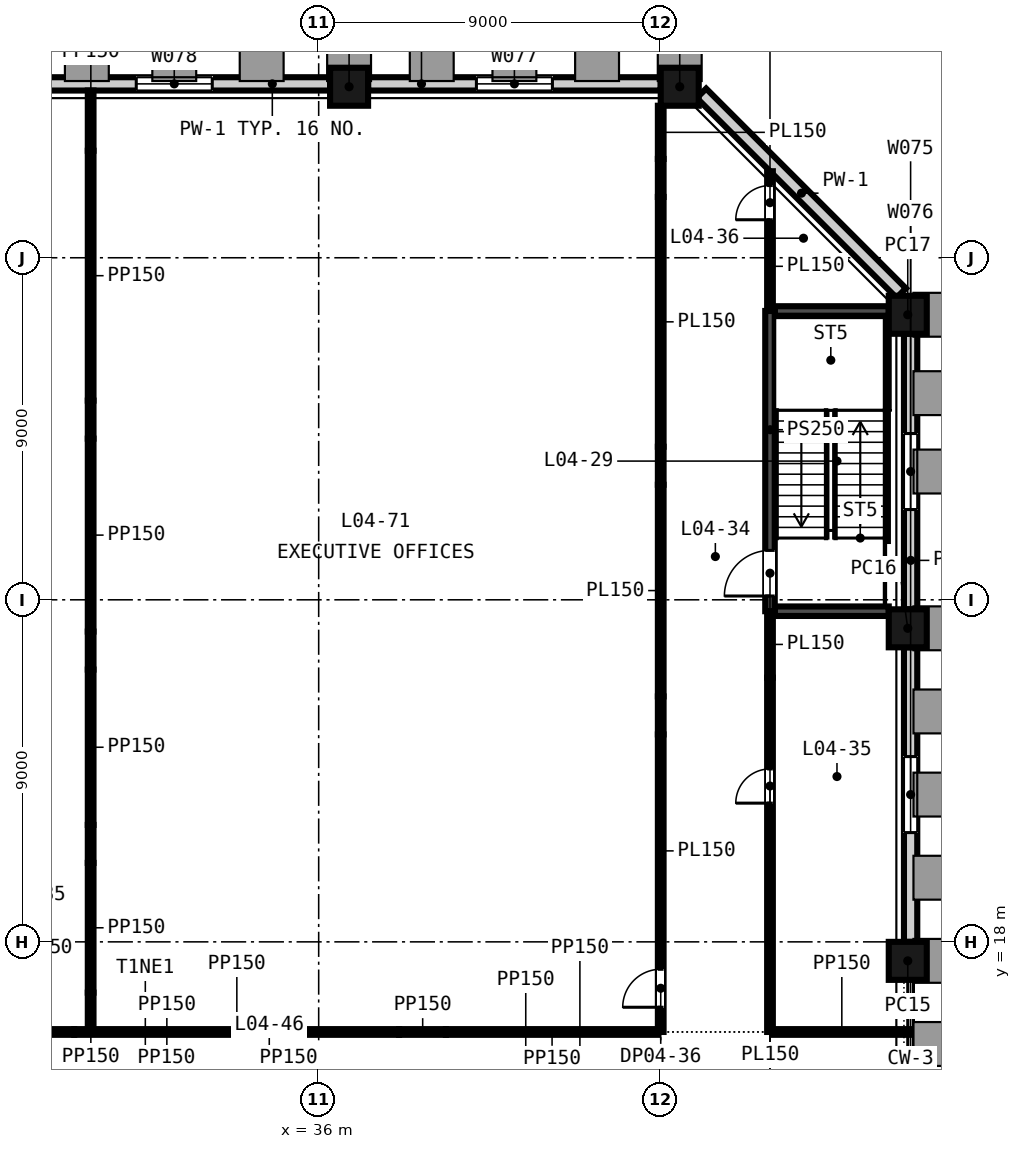
"""IFC4 building model, lengths in metres.
Left out: names, types, materials, properties, quantities, classifications, styles, units other than length and angle.
Written with IfcOpenShell. Run it as: python <this file> out.ifc"""

import sys

from ifc_helpers import new_model, si_unit, direction, frame, frame_2d, origin, origin_2d, place, context, subcontext, project, spatial, rectangle, extrude, element, fill, save


model = new_model("IFC4")
c1 = context("Model", 3, precision=1e-05, world=origin(), true_north=direction((0.0, 1.0)))
c2 = subcontext(c1, "Body", "Model", "MODEL_VIEW")
j1 = project(units=[si_unit("LENGTHUNIT", "METRE"), si_unit("PLANEANGLEUNIT", "RADIAN")], contexts=[c1])
p1 = place(None, origin())
s1 = spatial("IfcSite", under=j1, at=p1, CompositionType="ELEMENT")
p2 = place(p1, origin())
s2 = spatial("IfcBuilding", under=s1, at=p2, CompositionType="ELEMENT")
p3 = place(p2, frame((0.0, 0.0, 27.0)))
s3 = spatial("IfcBuildingStorey", under=s2, at=p3, CompositionType="ELEMENT", Elevation=27.0)
for number, where, z_axis, x_axis in (
    (1, (51.5, 17.5, -0.3), (0.0, 0.0, 1.0), (0.0, 1.0, 0.0)),
    (2, (51.5, 26.25, -0.3), (0.0, 0.0, 1.0), (0.0, 1.0, 0.0)),
    (3, (51.5, 34.5, -0.3), (0.0, 0.0, 1.0), (0.0, 1.0, 0.0)),
    (4, (45.5, 40.5, -0.3), (0.0, 0.0, 1.0), (-1.0, 0.0, 0.0)),
    (5, (36.8, 40.5, -0.3), (0.0, 0.0, 1.0), (-1.0, 0.0, 0.0)),
):
    element("IfcColumn", number, at=place(p3, frame(where, z_axis=z_axis, x_axis=x_axis)), inside=s3, PredefinedType="COLUMN", context=c2, shape_type="SweptSolid", body=[
        extrude(rectangle(XDim=1.0, YDim=1.0, at=origin_2d()), origin(), (0.0, 0.0, 1.0), 4.5),
    ])
p4 = place(p3, frame((51.575, 18.0, -0.3), z_axis=(0.0, 0.0, 1.0), x_axis=(0.0, 1.0, 0.0)))
e6 = element("IfcWall", 6, at=p4, inside=s3, PredefinedType="SOLIDWALL", context=c2, shape_type="SweptSolid", body=[
    extrude(rectangle(XDim=7.75, YDim=0.35, at=frame_2d((3.875, 0.0))), origin(), (0.0, 0.0, 1.0), 3.6),
])
p5 = place(p4, frame((2.875, 0.0, 1.2)))
e7 = element("IfcOpeningElement", 7, at=p5, cuts=e6, PredefinedType="OPENING", context=c2, shape_type="SweptSolid", body=[
    extrude(rectangle(XDim=2.0, YDim=2.35, at=frame_2d((1.0, 1.175))), frame((0.0, 0.185, 0.0), z_axis=(0.0, -1.0, 0.0), x_axis=(1.0, 0.0, 0.0)), (0.0, 0.0, 1.0), 0.37),
])
p6 = place(p3, frame((51.575, 26.75, -0.3), z_axis=(0.0, 0.0, 1.0), x_axis=(0.0, 1.0, 0.0)))
e8 = element("IfcWall", 8, at=p6, inside=s3, PredefinedType="SOLIDWALL", context=c2, shape_type="SweptSolid", body=[
    extrude(rectangle(XDim=7.25, YDim=0.35, at=frame_2d((3.625, 0.0))), origin(), (0.0, 0.0, 1.0), 3.6),
])
p7 = place(p6, frame((2.625, 0.0, 1.2)))
e9 = element("IfcOpeningElement", 9, at=p7, cuts=e8, PredefinedType="OPENING", context=c2, shape_type="SweptSolid", body=[
    extrude(rectangle(XDim=2.0, YDim=2.35, at=frame_2d((1.0, 1.175))), frame((0.0, 0.185, 0.0), z_axis=(0.0, -1.0, 0.0), x_axis=(1.0, 0.0, 0.0)), (0.0, 0.0, 1.0), 0.37),
])
p8 = place(p3, frame((51.327, 35.072, -0.3), z_axis=(0.0, 0.0, 1.0), x_axis=(-0.707106781187, 0.707106781187, 0.0)))
e10 = element("IfcWall", 10, at=p8, inside=s3, PredefinedType="SOLIDWALL", context=c2, shape_type="SweptSolid", body=[
    extrude(rectangle(XDim=7.433, YDim=0.35, at=frame_2d((3.716, 0.0))), origin(), (0.0, 0.0, 1.0), 3.6),
])
p9 = place(p3, frame((45.0, 40.575, -0.3), z_axis=(0.0, 0.0, 1.0), x_axis=(-1.0, 0.0, 0.0)))
e11 = element("IfcWall", 11, at=p9, inside=s3, PredefinedType="SOLIDWALL", context=c2, shape_type="SweptSolid", body=[
    extrude(rectangle(XDim=7.7, YDim=0.35, at=frame_2d((3.85, 0.0))), origin(), (0.0, 0.0, 1.0), 3.6),
])
p10 = place(p9, frame((2.85, 0.0, 1.2)))
e12 = element("IfcOpeningElement", 12, at=p10, cuts=e11, PredefinedType="OPENING", context=c2, shape_type="SweptSolid", body=[
    extrude(rectangle(XDim=2.0, YDim=2.35, at=frame_2d((1.0, 1.175))), frame((0.0, 0.185, 0.0), z_axis=(0.0, -1.0, 0.0), x_axis=(1.0, 0.0, 0.0)), (0.0, 0.0, 1.0), 0.37),
])
p11 = place(p3, frame((36.3, 40.575, -0.3), z_axis=(0.0, 0.0, 1.0), x_axis=(-1.0, 0.0, 0.0)))
e13 = element("IfcWall", 13, at=p11, inside=s3, PredefinedType="SOLIDWALL", context=c2, shape_type="SweptSolid", body=[
    extrude(rectangle(XDim=8.2, YDim=0.35, at=frame_2d((4.1, 0.0))), origin(), (0.0, 0.0, 1.0), 3.6),
])
p12 = place(p11, frame((3.1, 0.0, 1.2)))
e14 = element("IfcOpeningElement", 14, at=p12, cuts=e13, PredefinedType="OPENING", context=c2, shape_type="SweptSolid", body=[
    extrude(rectangle(XDim=2.0, YDim=2.35, at=frame_2d((1.0, 1.175))), frame((0.0, 0.185, 0.0), z_axis=(0.0, -1.0, 0.0), x_axis=(1.0, 0.0, 0.0)), (0.0, 0.0, 1.0), 0.37),
])
p13 = place(p3, frame((26.869, 15.629, 0.0), z_axis=(0.0, 0.0, 1.0), x_axis=(1.0, 0.0, 0.0)))
e15 = element("IfcWall", 15, at=p13, inside=s3, PredefinedType="PARTITIONING", context=c2, shape_type="SweptSolid", body=[
    extrude(rectangle(XDim=2.698, YDim=0.15, at=frame_2d((1.349, 0.0))), origin(), (0.0, 0.0, 1.0), 3.111),
])
p14 = place(p13, frame((0.9, 0.0, 0.0)))
e16 = element("IfcOpeningElement", 16, at=p14, cuts=e15, PredefinedType="OPENING", context=c2, shape_type="SweptSolid", body=[
    extrude(rectangle(XDim=1.0, YDim=2.1, at=frame_2d((0.5, 1.05))), frame((0.0, 0.085, 0.0), z_axis=(0.0, -1.0, 0.0), x_axis=(1.0, 0.0, 0.0)), (0.0, 0.0, 1.0), 0.17),
])
p15 = place(p3, frame((29.567, 15.629, 0.0), z_axis=(0.0, 0.0, 1.0), x_axis=(1.0, 0.0, 0.0)))
e17 = element("IfcWall", 17, at=p15, inside=s3, PredefinedType="PARTITIONING", context=c2, shape_type="SweptSolid", body=[
    extrude(rectangle(XDim=8.548, YDim=0.15, at=frame_2d((4.274, 0.0))), origin(), (0.0, 0.0, 1.0), 4.2),
])
p16 = place(p3, frame((38.116, 15.629, 0.0), z_axis=(0.0, 0.0, 1.0), x_axis=(1.0, 0.0, 0.0)))
e18 = element("IfcWall", 18, at=p16, inside=s3, PredefinedType="PARTITIONING", context=c2, shape_type="SweptSolid", body=[
    extrude(rectangle(XDim=1.231, YDim=0.15, at=frame_2d((0.616, 0.0))), origin(), (0.0, 0.0, 1.0), 3.219),
])
p17 = place(p3, frame((39.347, 15.629, 0.0), z_axis=(0.0, 0.0, 1.0), x_axis=(1.0, 0.0, 0.0)))
e19 = element("IfcWall", 19, at=p17, inside=s3, PredefinedType="PARTITIONING", context=c2, shape_type="SweptSolid", body=[
    extrude(rectangle(XDim=5.578, YDim=0.15, at=frame_2d((2.789, 0.0))), origin(), (0.0, 0.0, 1.0), 4.2),
])
p18 = place(p3, frame((47.95, 15.629, 0.0), z_axis=(0.0, 0.0, 1.0), x_axis=(1.0, 0.0, 0.0)))
e20 = element("IfcWall", 20, at=p18, inside=s3, PredefinedType="PARTITIONING", context=c2, shape_type="SweptSolid", body=[
    extrude(rectangle(XDim=3.62, YDim=0.15, at=frame_2d((1.81, 0.0))), origin(), (0.0, 0.0, 1.0), 4.2),
])
for number, where, z_axis, x_axis in (
    (21, (48.0, 26.7, 0.0), (0.0, 0.0, 1.0), (1.0, 0.0, 0.0)),
    (22, (48.0, 34.6, 0.0), (0.0, 0.0, 1.0), (1.0, 0.0, 0.0)),
):
    element("IfcWall", number, at=place(p3, frame(where, z_axis=z_axis, x_axis=x_axis)), inside=s3, PredefinedType="SHEAR", context=c2, shape_type="SweptSolid", body=[
        extrude(rectangle(XDim=3.0, YDim=0.25, at=frame_2d((1.5, 0.0))), origin(), (0.0, 0.0, 1.0), 4.2),
    ])
p19 = place(p3, frame((30.0, 15.704, 0.0), z_axis=(0.0, 0.0, 1.0), x_axis=(0.0, 1.0, 0.0)))
e23 = element("IfcWall", 23, at=p19, inside=s3, PredefinedType="PARTITIONING", context=c2, shape_type="SweptSolid", body=[
    extrude(rectangle(XDim=0.96, YDim=0.15, at=frame_2d((0.48, 0.0))), origin(), (0.0, 0.0, 1.0), 3.111),
])
p20 = place(p3, frame((30.0, 16.664, 0.0), z_axis=(0.0, 0.0, 1.0), x_axis=(0.0, 1.0, 0.0)))
e24 = element("IfcWall", 24, at=p20, inside=s3, PredefinedType="PARTITIONING", context=c2, shape_type="SweptSolid", body=[
    extrude(rectangle(XDim=3.413, YDim=0.15, at=frame_2d((1.707, 0.0))), origin(), (0.0, 0.0, 1.0), 4.2),
])
p21 = place(p3, frame((30.0, 20.077, 0.0), z_axis=(0.0, 0.0, 1.0), x_axis=(0.0, 1.0, 0.0)))
e25 = element("IfcWall", 25, at=p21, inside=s3, PredefinedType="PARTITIONING", context=c2, shape_type="SweptSolid", body=[
    extrude(rectangle(XDim=1.0, YDim=0.15, at=frame_2d((0.5, 0.0))), origin(), (0.0, 0.0, 1.0), 3.111),
])
p22 = place(p3, frame((30.0, 21.077, 0.0), z_axis=(0.0, 0.0, 1.0), x_axis=(0.0, 1.0, 0.0)))
e26 = element("IfcWall", 26, at=p22, inside=s3, PredefinedType="PARTITIONING", context=c2, shape_type="SweptSolid", body=[
    extrude(rectangle(XDim=4.087, YDim=0.15, at=frame_2d((2.043, 0.0))), origin(), (0.0, 0.0, 1.0), 4.2),
])
p23 = place(p3, frame((30.0, 25.164, 0.0), z_axis=(0.0, 0.0, 1.0), x_axis=(0.0, 1.0, 0.0)))
e27 = element("IfcWall", 27, at=p23, inside=s3, PredefinedType="PARTITIONING", context=c2, shape_type="SweptSolid", body=[
    extrude(rectangle(XDim=1.0, YDim=0.15, at=frame_2d((0.5, 0.0))), origin(), (0.0, 0.0, 1.0), 3.111),
])
p24 = place(p3, frame((30.0, 26.164, 0.0), z_axis=(0.0, 0.0, 1.0), x_axis=(0.0, 1.0, 0.0)))
e28 = element("IfcWall", 28, at=p24, inside=s3, PredefinedType="PARTITIONING", context=c2, shape_type="SweptSolid", body=[
    extrude(rectangle(XDim=5.076, YDim=0.15, at=frame_2d((2.538, 0.0))), origin(), (0.0, 0.0, 1.0), 4.2),
])
p25 = place(p3, frame((30.0, 31.24, 0.0), z_axis=(0.0, 0.0, 1.0), x_axis=(0.0, 1.0, 0.0)))
e29 = element("IfcWall", 29, at=p25, inside=s3, PredefinedType="PARTITIONING", context=c2, shape_type="SweptSolid", body=[
    extrude(rectangle(XDim=1.0, YDim=0.15, at=frame_2d((0.5, 0.0))), origin(), (0.0, 0.0, 1.0), 3.111),
])
p26 = place(p3, frame((30.0, 32.24, 0.0), z_axis=(0.0, 0.0, 1.0), x_axis=(0.0, 1.0, 0.0)))
e30 = element("IfcWall", 30, at=p26, inside=s3, PredefinedType="PARTITIONING", context=c2, shape_type="SweptSolid", body=[
    extrude(rectangle(XDim=6.575, YDim=0.15, at=frame_2d((3.288, 0.0))), origin(), (0.0, 0.0, 1.0), 4.2),
])
p27 = place(p3, frame((30.0, 38.816, 0.0), z_axis=(0.0, 0.0, 1.0), x_axis=(0.0, 1.0, 0.0)))
e31 = element("IfcWall", 31, at=p27, inside=s3, PredefinedType="PARTITIONING", context=c2, shape_type="SweptSolid", body=[
    extrude(rectangle(XDim=1.584, YDim=0.15, at=frame_2d((0.792, 0.0))), origin(), (0.0, 0.0, 1.0), 3.298),
])
p28 = place(p3, frame((45.0, 15.629, 0.0), z_axis=(0.0, 0.0, 1.0), x_axis=(0.0, 1.0, 0.0)))
e32 = element("IfcWall", 32, at=p28, inside=s3, PredefinedType="PARTITIONING", context=c2, shape_type="SweptSolid", body=[
    extrude(rectangle(XDim=7.829, YDim=0.15, at=frame_2d((3.915, 0.0))), origin(), (0.0, 0.0, 1.0), 4.2),
])
p29 = place(p28, frame((0.65, 0.0, 0.0)))
e33 = element("IfcOpeningElement", 33, at=p29, cuts=e32, PredefinedType="OPENING", context=c2, shape_type="SweptSolid", body=[
    extrude(rectangle(XDim=1.0, YDim=2.1, at=frame_2d((0.5, 1.05))), frame((0.0, 0.085, 0.0), z_axis=(0.0, -1.0, 0.0), x_axis=(1.0, 0.0, 0.0)), (0.0, 0.0, 1.0), 0.17),
])
p30 = place(p3, frame((45.0, 23.458, 0.0), z_axis=(0.0, 0.0, 1.0), x_axis=(0.0, 1.0, 0.0)))
e34 = element("IfcWall", 34, at=p30, inside=s3, PredefinedType="PARTITIONING", context=c2, shape_type="SweptSolid", body=[
    extrude(rectangle(XDim=1.0, YDim=0.15, at=frame_2d((0.5, 0.0))), origin(), (0.0, 0.0, 1.0), 3.111),
])
p31 = place(p3, frame((45.0, 24.458, 0.0), z_axis=(0.0, 0.0, 1.0), x_axis=(0.0, 1.0, 0.0)))
e35 = element("IfcWall", 35, at=p31, inside=s3, PredefinedType="PARTITIONING", context=c2, shape_type="SweptSolid", body=[
    extrude(rectangle(XDim=5.569, YDim=0.15, at=frame_2d((2.785, 0.0))), origin(), (0.0, 0.0, 1.0), 4.2),
])
p32 = place(p3, frame((45.0, 30.028, 0.0), z_axis=(0.0, 0.0, 1.0), x_axis=(0.0, 1.0, 0.0)))
e36 = element("IfcWall", 36, at=p32, inside=s3, PredefinedType="PARTITIONING", context=c2, shape_type="SweptSolid", body=[
    extrude(rectangle(XDim=1.0, YDim=0.15, at=frame_2d((0.5, 0.0))), origin(), (0.0, 0.0, 1.0), 3.111),
])
p33 = place(p3, frame((45.0, 31.028, 0.0), z_axis=(0.0, 0.0, 1.0), x_axis=(0.0, 1.0, 0.0)))
e37 = element("IfcWall", 37, at=p33, inside=s3, PredefinedType="PARTITIONING", context=c2, shape_type="SweptSolid", body=[
    extrude(rectangle(XDim=6.573, YDim=0.15, at=frame_2d((3.286, 0.0))), origin(), (0.0, 0.0, 1.0), 4.2),
])
p34 = place(p3, frame((45.0, 37.6, 0.0), z_axis=(0.0, 0.0, 1.0), x_axis=(0.0, 1.0, 0.0)))
e38 = element("IfcWall", 38, at=p34, inside=s3, PredefinedType="PARTITIONING", context=c2, shape_type="SweptSolid", body=[
    extrude(rectangle(XDim=1.0, YDim=0.15, at=frame_2d((0.5, 0.0))), origin(), (0.0, 0.0, 1.0), 3.111),
])
p35 = place(p3, frame((45.0, 38.6, 0.0), z_axis=(0.0, 0.0, 1.0), x_axis=(0.0, 1.0, 0.0)))
e39 = element("IfcWall", 39, at=p35, inside=s3, PredefinedType="PARTITIONING", context=c2, shape_type="SweptSolid", body=[
    extrude(rectangle(XDim=1.4, YDim=0.15, at=frame_2d((0.7, 0.0))), origin(), (0.0, 0.0, 1.0), 4.2),
])
p36 = place(p3, frame((47.875, 15.629, 0.0), z_axis=(0.0, 0.0, 1.0), x_axis=(0.0, 1.0, 0.0)))
e40 = element("IfcWall", 40, at=p36, inside=s3, PredefinedType="PARTITIONING", context=c2, shape_type="SweptSolid", body=[
    extrude(rectangle(XDim=9.323, YDim=0.15, at=frame_2d((4.661, 0.0))), origin(), (0.0, 0.0, 1.0), 4.2),
])
p37 = place(p36, frame((6.021, 0.0, 0.0)))
e41 = element("IfcOpeningElement", 41, at=p37, cuts=e40, PredefinedType="OPENING", context=c2, shape_type="SweptSolid", body=[
    extrude(rectangle(XDim=0.9, YDim=2.1, at=frame_2d((0.45, 1.05))), frame((0.0, 0.085, 0.0), z_axis=(0.0, -1.0, 0.0), x_axis=(1.0, 0.0, 0.0)), (0.0, 0.0, 1.0), 0.17),
])
p38 = place(p3, frame((47.875, 24.952, 0.0), z_axis=(0.0, 0.0, 1.0), x_axis=(0.0, 1.0, 0.0)))
e42 = element("IfcWall", 42, at=p38, inside=s3, PredefinedType="PARTITIONING", context=c2, shape_type="SweptSolid", body=[
    extrude(rectangle(XDim=1.748, YDim=0.15, at=frame_2d((0.874, 0.0))), origin(), (0.0, 0.0, 1.0), 3.111),
])
p39 = place(p3, frame((47.875, 26.7, 0.0), z_axis=(0.0, 0.0, 1.0), x_axis=(0.0, 1.0, 0.0)))
e43 = element("IfcWall", 43, at=p39, inside=s3, PredefinedType="SHEAR", context=c2, shape_type="SweptSolid", body=[
    extrude(rectangle(XDim=7.9, YDim=0.25, at=frame_2d((3.95, 0.0))), origin(), (0.0, 0.0, 1.0), 4.2),
])
p40 = place(p39, frame((0.4, 0.0, 0.0)))
e44 = element("IfcOpeningElement", 44, at=p40, cuts=e43, PredefinedType="OPENING", context=c2, shape_type="SweptSolid", body=[
    extrude(rectangle(XDim=1.2, YDim=2.1, at=frame_2d((0.6, 1.05))), frame((0.0, 0.135, 0.0), z_axis=(0.0, -1.0, 0.0), x_axis=(1.0, 0.0, 0.0)), (0.0, 0.0, 1.0), 0.27),
])
p41 = place(p3, frame((47.875, 34.6, 0.0), z_axis=(0.0, 0.0, 1.0), x_axis=(0.0, 1.0, 0.0)))
e45 = element("IfcWall", 45, at=p41, inside=s3, PredefinedType="PARTITIONING", context=c2, shape_type="SweptSolid", body=[
    extrude(rectangle(XDim=3.677, YDim=0.15, at=frame_2d((1.838, 0.0))), origin(), (0.0, 0.0, 1.0), 3.667),
])
p42 = place(p41, frame((2.4, 0.0, 0.0)))
e46 = element("IfcOpeningElement", 46, at=p42, cuts=e45, PredefinedType="OPENING", context=c2, shape_type="SweptSolid", body=[
    extrude(rectangle(XDim=0.9, YDim=2.1, at=frame_2d((0.45, 1.05))), frame((0.0, 0.085, 0.0), z_axis=(0.0, -1.0, 0.0), x_axis=(1.0, 0.0, 0.0)), (0.0, 0.0, 1.0), 0.17),
])
p43 = place(p5, origin())
e47 = element("IfcWindow", 47, at=p43, inside=s3, PartitioningType="SINGLE_PANEL", PredefinedType="WINDOW", context=c2, shape_type="SweptSolid", body=[
    extrude(rectangle(XDim=2.0, YDim=2.35, at=frame_2d((1.0, 1.175))), frame((0.0, 0.03, 0.0), z_axis=(0.0, -1.0, 0.0), x_axis=(1.0, 0.0, 0.0)), (0.0, 0.0, 1.0), 0.06),
])
fill(e7, e47)
p44 = place(p7, origin())
e48 = element("IfcWindow", 48, at=p44, inside=s3, PartitioningType="SINGLE_PANEL", PredefinedType="WINDOW", context=c2, shape_type="SweptSolid", body=[
    extrude(rectangle(XDim=2.0, YDim=2.35, at=frame_2d((1.0, 1.175))), frame((0.0, 0.03, 0.0), z_axis=(0.0, -1.0, 0.0), x_axis=(1.0, 0.0, 0.0)), (0.0, 0.0, 1.0), 0.06),
])
fill(e9, e48)
p45 = place(p10, origin())
e49 = element("IfcWindow", 49, at=p45, inside=s3, PartitioningType="SINGLE_PANEL", PredefinedType="WINDOW", context=c2, shape_type="SweptSolid", body=[
    extrude(rectangle(XDim=2.0, YDim=2.35, at=frame_2d((1.0, 1.175))), frame((0.0, 0.03, 0.0), z_axis=(0.0, -1.0, 0.0), x_axis=(1.0, 0.0, 0.0)), (0.0, 0.0, 1.0), 0.06),
])
fill(e12, e49)
p46 = place(p12, origin())
e50 = element("IfcWindow", 50, at=p46, inside=s3, PartitioningType="SINGLE_PANEL", PredefinedType="WINDOW", context=c2, shape_type="SweptSolid", body=[
    extrude(rectangle(XDim=2.0, YDim=2.35, at=frame_2d((1.0, 1.175))), frame((0.0, 0.03, 0.0), z_axis=(0.0, -1.0, 0.0), x_axis=(1.0, 0.0, 0.0)), (0.0, 0.0, 1.0), 0.06),
])
fill(e14, e50)
p47 = place(p40, origin())
e51 = element("IfcDoor", 51, at=p47, inside=s3, OperationType="SINGLE_SWING_LEFT", PredefinedType="DOOR", context=c2, shape_type="SweptSolid", body=[
    extrude(rectangle(XDim=1.2, YDim=2.1, at=frame_2d((0.6, 1.05))), frame((0.0, 0.025, 0.0), z_axis=(0.0, -1.0, 0.0), x_axis=(1.0, 0.0, 0.0)), (0.0, 0.0, 1.0), 0.05),
])
fill(e44, e51)
p48 = place(p37, origin())
e52 = element("IfcDoor", 52, at=p48, inside=s3, OperationType="SINGLE_SWING_LEFT", PredefinedType="DOOR", context=c2, shape_type="SweptSolid", body=[
    extrude(rectangle(XDim=0.9, YDim=2.1, at=frame_2d((0.45, 1.05))), frame((0.0, 0.025, 0.0), z_axis=(0.0, -1.0, 0.0), x_axis=(1.0, 0.0, 0.0)), (0.0, 0.0, 1.0), 0.05),
])
fill(e41, e52)
p49 = place(p42, origin())
e53 = element("IfcDoor", 53, at=p49, inside=s3, OperationType="SINGLE_SWING_LEFT", PredefinedType="DOOR", context=c2, shape_type="SweptSolid", body=[
    extrude(rectangle(XDim=0.9, YDim=2.1, at=frame_2d((0.45, 1.05))), frame((0.0, 0.025, 0.0), z_axis=(0.0, -1.0, 0.0), x_axis=(1.0, 0.0, 0.0)), (0.0, 0.0, 1.0), 0.05),
])
fill(e46, e53)
p50 = place(p29, origin())
e54 = element("IfcDoor", 54, at=p50, inside=s3, OperationType="SINGLE_SWING_LEFT", PredefinedType="DOOR", context=c2, shape_type="SweptSolid", body=[
    extrude(rectangle(XDim=1.0, YDim=2.1, at=frame_2d((0.5, 1.05))), frame((0.0, 0.025, 0.0), z_axis=(0.0, -1.0, 0.0), x_axis=(1.0, 0.0, 0.0)), (0.0, 0.0, 1.0), 0.05),
])
fill(e33, e54)
save(model, sys.argv[1])
